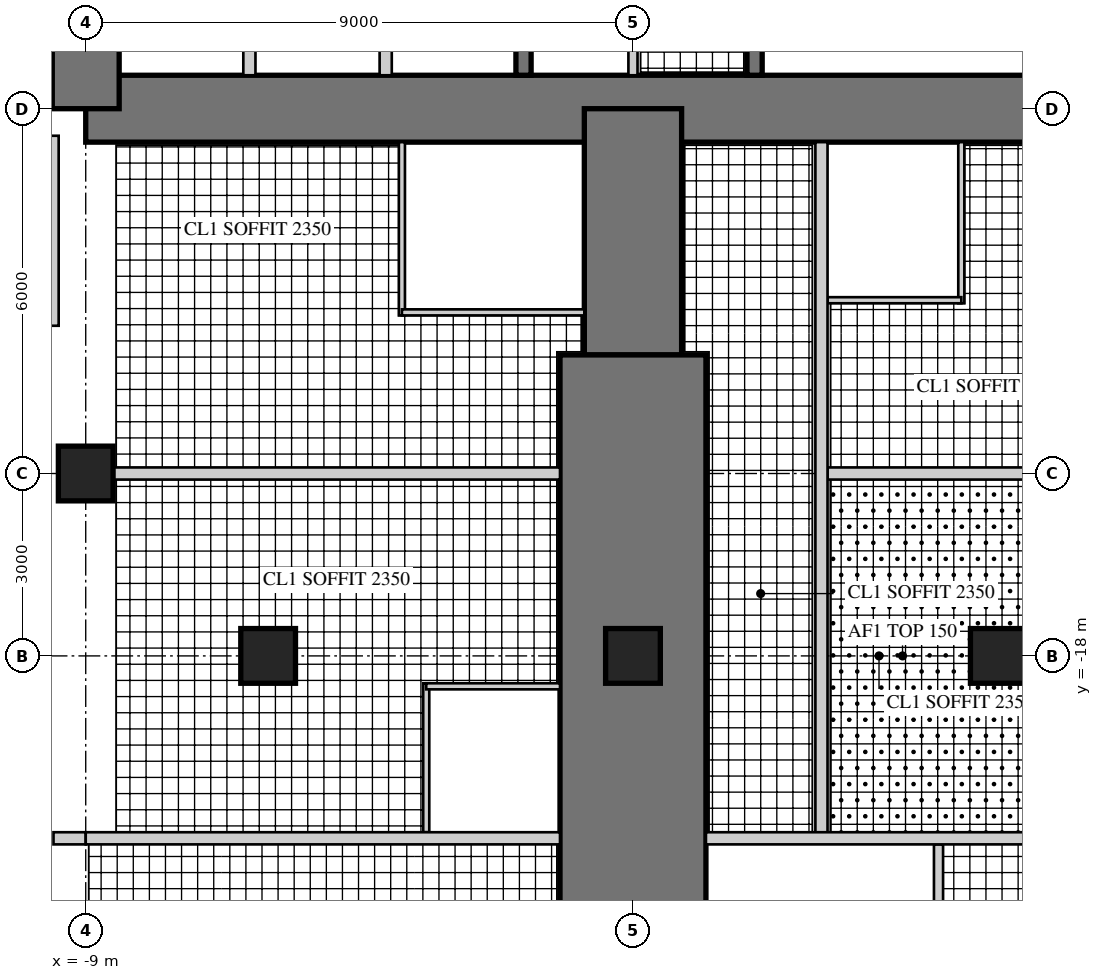
"""IFC4 building model, lengths in metres.
Left out: names, types, materials, properties, quantities, classifications, styles, units other than length and angle.
Written with IfcOpenShell. Run it as: python <this file> out.ifc"""

import sys

from ifc_helpers import new_model, si_unit, direction, frame, frame_2d, origin, origin_2d, place, context, subcontext, project, spatial, rectangle, hollow_rectangle, extrude, element, fill, save


model = new_model("IFC4")
c1 = context("Model", 3, precision=1e-05, world=origin(), true_north=direction((0.0, 1.0)))
c2 = subcontext(c1, "Body", "Model", "MODEL_VIEW")
j1 = project(units=[si_unit("LENGTHUNIT", "METRE"), si_unit("PLANEANGLEUNIT", "RADIAN")], contexts=[c1])
p1 = place(None, origin())
s1 = spatial("IfcSite", under=j1, at=p1, CompositionType="ELEMENT")
p2 = place(p1, origin())
s2 = spatial("IfcBuilding", under=s1, at=p2, CompositionType="ELEMENT")
p3 = place(p2, frame((0.0, 0.0, 206.9)))
s3 = spatial("IfcBuildingStorey", under=s2, at=p3, CompositionType="ELEMENT", Elevation=206.9)
p4 = place(p3, frame((-9.0, -9.0, 0.0), z_axis=(0.0, 0.0, 1.0), x_axis=(1.0, 0.0, 0.0)))
e1 = element("IfcWall", 1, at=p4, inside=s3, PredefinedType="SHEAR", context=c2, shape_type="SweptSolid", body=[
    extrude(rectangle(XDim=18.0, YDim=1.1, at=frame_2d((9.0, 0.0))), origin(), (0.0, 0.0, 1.0), 3.4),
])
p5 = place(p4, frame((9.8, 0.0, 0.0)))
e2 = element("IfcOpeningElement", 2, at=p5, cuts=e1, PredefinedType="OPENING", context=c2, shape_type="SweptSolid", body=[
    extrude(rectangle(XDim=1.0, YDim=2.4, at=frame_2d((0.5, 1.2))), frame((0.0, 0.56, 0.0), z_axis=(0.0, -1.0, 0.0), x_axis=(1.0, 0.0, 0.0)), (0.0, 0.0, 1.0), 1.12),
])
p6 = place(p3, frame((-9.0, 9.0, 0.0), z_axis=(0.0, 0.0, 1.0), x_axis=(0.0, -1.0, 0.0)))
e3 = element("IfcWall", 3, at=p6, inside=s3, PredefinedType="SHEAR", context=c2, shape_type="SweptSolid", body=[
    extrude(rectangle(XDim=18.0, YDim=1.1, at=frame_2d((9.0, 0.0))), origin(), (0.0, 0.0, 1.0), 3.4),
])
p7 = place(p6, frame((9.8, 0.0, 0.0)))
e4 = element("IfcOpeningElement", 4, at=p7, cuts=e3, PredefinedType="OPENING", context=c2, shape_type="SweptSolid", body=[
    extrude(rectangle(XDim=1.0, YDim=2.4, at=frame_2d((0.5, 1.2))), frame((0.0, 0.56, 0.0), z_axis=(0.0, -1.0, 0.0), x_axis=(1.0, 0.0, 0.0)), (0.0, 0.0, 1.0), 1.12),
])
p8 = place(p3, frame((-1.8, -1.875, 0.0), z_axis=(0.0, 0.0, 1.0), x_axis=(0.0, -1.0, 0.0)))
e5 = element("IfcWall", 5, at=p8, inside=s3, PredefinedType="SHEAR", context=c2, shape_type="SweptSolid", body=[
    extrude(rectangle(XDim=6.575, YDim=0.25, at=frame_2d((3.288, 0.0))), origin(), (0.0, 0.0, 1.0), 3.4),
])
p9 = place(p8, frame((1.875, 0.0, 0.0)))
e6 = element("IfcOpeningElement", 6, at=p9, cuts=e5, PredefinedType="OPENING", context=c2, shape_type="SweptSolid", body=[
    extrude(rectangle(XDim=1.6, YDim=2.4, at=frame_2d((0.8, 1.2))), frame((0.0, 0.135, 0.0), z_axis=(0.0, -1.0, 0.0), x_axis=(1.0, 0.0, 0.0)), (0.0, 0.0, 1.0), 0.27),
])
for number, where, z_axis, x_axis in (
    (7, (-4.067, -5.975, 0.0), (0.0, 0.0, 1.0), (0.0, -1.0, 0.0)),
    (8, (-6.308, -5.975, 0.0), (0.0, 0.0, 1.0), (0.0, -1.0, 0.0)),
):
    element("IfcWall", number, at=place(p3, frame(where, z_axis=z_axis, x_axis=x_axis)), inside=s3, PredefinedType="PARTITIONING", context=c2, shape_type="SweptSolid", body=[
        extrude(rectangle(XDim=2.475, YDim=0.2, at=frame_2d((1.237, 0.0))), origin(), (0.0, 0.0, 1.0), 3.4),
    ])
p10 = place(p3, frame((2.0, -1.675, 0.0), z_axis=(0.0, 0.0, 1.0), x_axis=(0.0, -1.0, 0.0)))
e9 = element("IfcWall", 9, at=p10, inside=s3, PredefinedType="SHEAR", context=c2, shape_type="SweptSolid", body=[
    extrude(rectangle(XDim=6.775, YDim=0.25, at=frame_2d((3.387, 0.0))), origin(), (0.0, 0.0, 1.0), 3.4),
])
p11 = place(p10, frame((0.725, 0.0, 0.0)))
e10 = element("IfcOpeningElement", 10, at=p11, cuts=e9, PredefinedType="OPENING", context=c2, shape_type="SweptSolid", body=[
    extrude(rectangle(XDim=1.0, YDim=2.1, at=frame_2d((0.5, 1.05))), frame((0.0, 0.135, 0.0), z_axis=(0.0, -1.0, 0.0), x_axis=(1.0, 0.0, 0.0)), (0.0, 0.0, 1.0), 0.27),
])
p12 = place(p3, frame((0.0, -9.0, 0.0), z_axis=(0.0, 0.0, 1.0), x_axis=(0.0, -1.0, 0.0)))
e11 = element("IfcWall", 11, at=p12, inside=s3, PredefinedType="SHEAR", context=c2, shape_type="SweptSolid", body=[
    extrude(rectangle(XDim=4.05, YDim=1.6, at=frame_2d((2.025, 0.0))), origin(), (0.0, 0.0, 1.0), 3.4),
])
p13 = place(p3, frame((0.0, -13.05, 0.0), z_axis=(0.0, 0.0, 1.0), x_axis=(0.0, -1.0, 0.0)))
e12 = element("IfcWall", 12, at=p13, inside=s3, PredefinedType="SHEAR", context=c2, shape_type="SweptSolid", body=[
    extrude(rectangle(XDim=13.95, YDim=2.4, at=frame_2d((6.975, 0.0))), origin(), (0.0, 0.0, 1.0), 3.4),
])
p14 = place(p13, frame((0.3, 0.0, 0.0)))
e13 = element("IfcOpeningElement", 13, at=p14, cuts=e12, PredefinedType="OPENING", context=c2, shape_type="SweptSolid", body=[
    extrude(rectangle(XDim=1.0, YDim=2.15, at=frame_2d((0.5, 1.075))), frame((0.0, 1.21, 0.0), z_axis=(0.0, -1.0, 0.0), x_axis=(1.0, 0.0, 0.0)), (0.0, 0.0, 1.0), 2.42),
])
p15 = place(p13, frame((2.55, 0.0, 0.0)))
e14 = element("IfcOpeningElement", 14, at=p15, cuts=e12, PredefinedType="OPENING", context=c2, shape_type="SweptSolid", body=[
    extrude(rectangle(XDim=1.0, YDim=2.15, at=frame_2d((0.5, 1.075))), frame((0.0, 1.21, 0.0), z_axis=(0.0, -1.0, 0.0), x_axis=(1.0, 0.0, 0.0)), (0.0, 0.0, 1.0), 2.42),
])
p16 = place(p13, frame((9.2, 0.0, 0.0)))
e15 = element("IfcOpeningElement", 15, at=p16, cuts=e12, PredefinedType="OPENING", context=c2, shape_type="SweptSolid", body=[
    extrude(rectangle(XDim=1.0, YDim=2.2, at=frame_2d((0.5, 1.1))), frame((0.0, 1.21, 0.0), z_axis=(0.0, -1.0, 0.0), x_axis=(1.0, 0.0, 0.0)), (0.0, 0.0, 1.0), 2.42),
])
for number, where, z_axis, x_axis in (
    (16, (-9.0, -15.0, 0.0), (0.0, 0.0, 1.0), (1.0, 0.0, 0.0)),
    (17, (-6.0, -18.0, 0.0), (0.0, 0.0, 1.0), (1.0, 0.0, 0.0)),
    (18, (0.0, -18.0, 0.0), (0.0, 0.0, 1.0), (1.0, 0.0, 0.0)),
    (19, (6.0, -18.0, 0.0), (0.0, 0.0, 1.0), (1.0, 0.0, 0.0)),
):
    element("IfcColumn", number, at=place(p3, frame(where, z_axis=z_axis, x_axis=x_axis)), inside=s3, PredefinedType="COLUMN", context=c2, shape_type="SweptSolid", body=[
        extrude(rectangle(XDim=0.9, YDim=0.9, at=origin_2d()), origin(), (0.0, 0.0, 1.0), 3.4),
    ])
p17 = place(p3, frame((-9.57, -9.445, 0.0), z_axis=(0.0, 0.0, 1.0), x_axis=(0.0, -1.0, 0.0)))
e20 = element("IfcWall", 20, at=p17, inside=s3, PredefinedType="SOLIDWALL", context=c2, shape_type="SweptSolid", body=[
    extrude(rectangle(XDim=3.125, YDim=0.25, at=frame_2d((1.562, 0.0))), origin(), (0.0, 0.0, 1.0), 3.22),
])
p18 = place(p17, frame((0.6, 0.0, 0.0)))
e21 = element("IfcOpeningElement", 21, at=p18, cuts=e20, PredefinedType="OPENING", context=c2, shape_type="SweptSolid", body=[
    extrude(rectangle(XDim=1.0, YDim=2.2, at=frame_2d((0.5, 1.1))), frame((0.0, 0.135, 0.0), z_axis=(0.0, -1.0, 0.0), x_axis=(1.0, 0.0, 0.0)), (0.0, 0.0, 1.0), 0.27),
])
p19 = place(p3, frame((0.0, -5.675, 0.0), z_axis=(0.0, 0.0, 1.0), x_axis=(0.0, -1.0, 0.0)))
e22 = element("IfcWall", 22, at=p19, inside=s3, PredefinedType="PARTITIONING", context=c2, shape_type="SweptSolid", body=[
    extrude(rectangle(XDim=2.775, YDim=0.15, at=frame_2d((1.387, 0.0))), origin(), (0.0, 0.0, 1.0), 3.22),
])
p20 = place(p19, frame((0.4, 0.0, 0.0)))
e23 = element("IfcOpeningElement", 23, at=p20, cuts=e22, PredefinedType="OPENING", context=c2, shape_type="SweptSolid", body=[
    extrude(rectangle(XDim=1.0, YDim=2.1, at=frame_2d((0.5, 1.05))), frame((0.0, 0.085, 0.0), z_axis=(0.0, -1.0, 0.0), x_axis=(1.0, 0.0, 0.0)), (0.0, 0.0, 1.0), 0.17),
])
p21 = place(p3, frame((5.4, -9.55, 0.0), z_axis=(0.0, 0.0, 1.0), x_axis=(0.0, -1.0, 0.0)))
e24 = element("IfcWall", 24, at=p21, inside=s3, PredefinedType="PARTITIONING", context=c2, shape_type="SweptSolid", body=[
    extrude(rectangle(XDim=2.65, YDim=0.1, at=frame_2d((1.325, 0.0))), origin(), (0.0, 0.0, 1.0), 3.22),
])
p22 = place(p3, frame((3.2, -12.15, 0.0), z_axis=(0.0, 0.0, 1.0), x_axis=(1.0, 0.0, 0.0)))
e25 = element("IfcWall", 25, at=p22, inside=s3, PredefinedType="PARTITIONING", context=c2, shape_type="SweptSolid", body=[
    extrude(rectangle(XDim=2.2, YDim=0.1, at=frame_2d((1.1, 0.0))), origin(), (0.0, 0.0, 1.0), 3.22),
])
p23 = place(p22, frame((0.55, 0.0, 0.0)))
e26 = element("IfcOpeningElement", 26, at=p23, cuts=e25, PredefinedType="OPENING", context=c2, shape_type="SweptSolid", body=[
    extrude(rectangle(XDim=0.9, YDim=2.1, at=frame_2d((0.45, 1.05))), frame((0.0, 0.06, 0.0), z_axis=(0.0, -1.0, 0.0), x_axis=(1.0, 0.0, 0.0)), (0.0, 0.0, 1.0), 0.12),
])
p24 = place(p3, frame((-3.8, -9.55, 0.0), z_axis=(0.0, 0.0, 1.0), x_axis=(0.0, -1.0, 0.0)))
e27 = element("IfcWall", 27, at=p24, inside=s3, PredefinedType="PARTITIONING", context=c2, shape_type="SweptSolid", body=[
    extrude(rectangle(XDim=2.85, YDim=0.1, at=frame_2d((1.425, 0.0))), origin(), (0.0, 0.0, 1.0), 3.22),
])
p25 = place(p3, frame((-3.8, -12.35, 0.0), z_axis=(0.0, 0.0, 1.0), x_axis=(1.0, 0.0, 0.0)))
e28 = element("IfcWall", 28, at=p25, inside=s3, PredefinedType="PARTITIONING", context=c2, shape_type="SweptSolid", body=[
    extrude(rectangle(XDim=3.0, YDim=0.1, at=frame_2d((1.5, 0.0))), origin(), (0.0, 0.0, 1.0), 3.22),
])
p26 = place(p25, frame((0.55, 0.0, 0.0)))
e29 = element("IfcOpeningElement", 29, at=p26, cuts=e28, PredefinedType="OPENING", context=c2, shape_type="SweptSolid", body=[
    extrude(rectangle(XDim=0.9, YDim=2.1, at=frame_2d((0.45, 1.05))), frame((0.0, 0.06, 0.0), z_axis=(0.0, -1.0, 0.0), x_axis=(1.0, 0.0, 0.0)), (0.0, 0.0, 1.0), 0.12),
])
p27 = place(p3, frame((3.2, -15.0, 0.0), z_axis=(0.0, 0.0, 1.0), x_axis=(1.0, 0.0, 0.0)))
e30 = element("IfcWall", 30, at=p27, inside=s3, PredefinedType="SOLIDWALL", context=c2, shape_type="SweptSolid", body=[
    extrude(rectangle(XDim=5.35, YDim=0.2, at=frame_2d((2.675, 0.0))), origin(), (0.0, 0.0, 1.0), 2.47),
])
p28 = place(p3, frame((-8.55, -15.0, 0.0), z_axis=(0.0, 0.0, 1.0), x_axis=(1.0, 0.0, 0.0)))
e31 = element("IfcWall", 31, at=p28, inside=s3, PredefinedType="SOLIDWALL", context=c2, shape_type="SweptSolid", body=[
    extrude(rectangle(XDim=7.35, YDim=0.2, at=frame_2d((3.675, 0.0))), origin(), (0.0, 0.0, 1.0), 2.47),
])
p29 = place(p3, frame((-3.4, -18.45, 0.0), z_axis=(0.0, 0.0, 1.0), x_axis=(0.0, -1.0, 0.0)))
e32 = element("IfcWall", 32, at=p29, inside=s3, PredefinedType="PARTITIONING", context=c2, shape_type="SweptSolid", body=[
    extrude(rectangle(XDim=2.45, YDim=0.1, at=frame_2d((1.225, 0.0))), origin(), (0.0, 0.0, 1.0), 3.22),
])
p30 = place(p3, frame((-3.4, -18.5, 0.0), z_axis=(0.0, 0.0, 1.0), x_axis=(1.0, 0.0, 0.0)))
e33 = element("IfcWall", 33, at=p30, inside=s3, PredefinedType="PARTITIONING", context=c2, shape_type="SweptSolid", body=[
    extrude(rectangle(XDim=2.2, YDim=0.1, at=frame_2d((1.1, 0.0))), origin(), (0.0, 0.0, 1.0), 3.22),
])
p31 = place(p30, frame((0.55, 0.0, 0.0)))
e34 = element("IfcOpeningElement", 34, at=p31, cuts=e33, PredefinedType="OPENING", context=c2, shape_type="SweptSolid", body=[
    extrude(rectangle(XDim=0.9, YDim=2.1, at=frame_2d((0.45, 1.05))), frame((0.0, 0.06, 0.0), z_axis=(0.0, -1.0, 0.0), x_axis=(1.0, 0.0, 0.0)), (0.0, 0.0, 1.0), 0.12),
])
p32 = place(p3, frame((3.1, -9.55, 0.0), z_axis=(0.0, 0.0, 1.0), x_axis=(0.0, -1.0, 0.0)))
e35 = element("IfcWall", 35, at=p32, inside=s3, PredefinedType="SOLIDWALL", context=c2, shape_type="SweptSolid", body=[
    extrude(rectangle(XDim=11.45, YDim=0.2, at=frame_2d((5.725, 0.0))), origin(), (0.0, 0.0, 1.0), 3.22),
])
p33 = place(p32, frame((3.4, 0.0, 0.0)))
e36 = element("IfcOpeningElement", 36, at=p33, cuts=e35, PredefinedType="OPENING", context=c2, shape_type="SweptSolid", body=[
    extrude(rectangle(XDim=1.0, YDim=2.15, at=frame_2d((0.5, 1.075))), frame((0.0, 0.11, 0.0), z_axis=(0.0, -1.0, 0.0), x_axis=(1.0, 0.0, 0.0)), (0.0, 0.0, 1.0), 0.22),
])
p34 = place(p32, frame((6.65, 0.0, 0.0)))
e37 = element("IfcOpeningElement", 37, at=p34, cuts=e35, PredefinedType="OPENING", context=c2, shape_type="SweptSolid", body=[
    extrude(rectangle(XDim=1.0, YDim=2.2, at=frame_2d((0.5, 1.1))), frame((0.0, 0.11, 0.0), z_axis=(0.0, -1.0, 0.0), x_axis=(1.0, 0.0, 0.0)), (0.0, 0.0, 1.0), 0.22),
])
p35 = place(p3, frame((5.025, -21.1, 0.0), z_axis=(0.0, 0.0, 1.0), x_axis=(0.0, -1.0, 0.0)))
e38 = element("IfcWall", 38, at=p35, inside=s3, PredefinedType="PARTITIONING", context=c2, shape_type="SweptSolid", body=[
    extrude(rectangle(XDim=5.45, YDim=0.15, at=frame_2d((2.725, 0.0))), origin(), (0.0, 0.0, 1.0), 3.22),
])
p36 = place(p35, frame((0.6, 0.0, 0.0)))
e39 = element("IfcOpeningElement", 39, at=p36, cuts=e38, PredefinedType="OPENING", context=c2, shape_type="SweptSolid", body=[
    extrude(rectangle(XDim=1.0, YDim=2.1, at=frame_2d((0.5, 1.05))), frame((0.0, 0.085, 0.0), z_axis=(0.0, -1.0, 0.0), x_axis=(1.0, 0.0, 0.0)), (0.0, 0.0, 1.0), 0.17),
])
p37 = place(p3, frame((-9.53, -21.0, 0.0), z_axis=(0.0, 0.0, 1.0), x_axis=(1.0, 0.0, 0.0)))
e40 = element("IfcWall", 40, at=p37, inside=s3, PredefinedType="SOLIDWALL", context=c2, shape_type="SweptSolid", body=[
    extrude(rectangle(XDim=0.53, YDim=0.2, at=frame_2d((0.265, 0.0))), origin(), (0.0, 0.0, 1.0), 3.22),
])
p38 = place(p3, frame((-9.0, -21.0, 0.0), z_axis=(0.0, 0.0, 1.0), x_axis=(1.0, 0.0, 0.0)))
e41 = element("IfcWall", 41, at=p38, inside=s3, PredefinedType="SOLIDWALL", context=c2, shape_type="SweptSolid", body=[
    extrude(rectangle(XDim=7.8, YDim=0.2, at=frame_2d((3.9, 0.0))), origin(), (0.0, 0.0, 1.0), 2.62),
])
p39 = place(p3, frame((1.2, -21.0, 0.0), z_axis=(0.0, 0.0, 1.0), x_axis=(1.0, 0.0, 0.0)))
e42 = element("IfcWall", 42, at=p39, inside=s3, PredefinedType="SOLIDWALL", context=c2, shape_type="SweptSolid", body=[
    extrude(rectangle(XDim=7.8, YDim=0.2, at=frame_2d((3.9, 0.0))), origin(), (0.0, 0.0, 1.0), 2.62),
])
p40 = place(p39, frame((0.35, 0.0, 0.0)))
e43 = element("IfcOpeningElement", 43, at=p40, cuts=e42, PredefinedType="OPENING", context=c2, shape_type="SweptSolid", body=[
    extrude(rectangle(XDim=1.0, YDim=2.2, at=frame_2d((0.5, 1.1))), frame((0.0, 0.11, 0.0), z_axis=(0.0, -1.0, 0.0), x_axis=(1.0, 0.0, 0.0)), (0.0, 0.0, 1.0), 0.22),
])
p41 = place(p18, origin())
e44 = element("IfcDoor", 44, at=p41, inside=s3, OperationType="SINGLE_SWING_LEFT", PredefinedType="DOOR", context=c2, shape_type="SweptSolid", body=[
    extrude(hollow_rectangle(XDim=1.0, YDim=2.2, WallThickness=0.06, at=frame_2d((0.5, 1.1))), frame((0.0, 0.025, 0.0), z_axis=(0.0, -1.0, 0.0), x_axis=(1.0, 0.0, 0.0)), (0.0, 0.0, 1.0), 0.05),
    extrude(rectangle(XDim=0.879, YDim=2.079, at=frame_2d((0.5, 1.1))), frame((0.0, 0.025, 0.0), z_axis=(0.0, -1.0, 0.0), x_axis=(1.0, 0.0, 0.0)), (0.0, 0.0, 1.0), 0.05),
])
fill(e21, e44)
p42 = place(p23, origin())
e45 = element("IfcDoor", 45, at=p42, inside=s3, OperationType="SINGLE_SWING_LEFT", PredefinedType="DOOR", context=c2, shape_type="SweptSolid", body=[
    extrude(rectangle(XDim=0.9, YDim=2.1, at=frame_2d((0.45, 1.05))), frame((0.0, 0.025, 0.0), z_axis=(0.0, -1.0, 0.0), x_axis=(1.0, 0.0, 0.0)), (0.0, 0.0, 1.0), 0.05),
])
fill(e26, e45)
p43 = place(p26, origin())
e46 = element("IfcDoor", 46, at=p43, inside=s3, OperationType="SINGLE_SWING_LEFT", PredefinedType="DOOR", context=c2, shape_type="SweptSolid", body=[
    extrude(rectangle(XDim=0.9, YDim=2.1, at=frame_2d((0.45, 1.05))), frame((0.0, 0.025, 0.0), z_axis=(0.0, -1.0, 0.0), x_axis=(1.0, 0.0, 0.0)), (0.0, 0.0, 1.0), 0.05),
])
fill(e29, e46)
p44 = place(p31, frame((0.9, 0.0, 0.0), z_axis=(0.0, 0.0, 1.0), x_axis=(-1.0, 0.0, 0.0)))
e47 = element("IfcDoor", 47, at=p44, inside=s3, OperationType="SINGLE_SWING_RIGHT", PredefinedType="DOOR", context=c2, shape_type="SweptSolid", body=[
    extrude(rectangle(XDim=0.9, YDim=2.1, at=frame_2d((0.45, 1.05))), frame((0.0, 0.025, 0.0), z_axis=(0.0, -1.0, 0.0), x_axis=(1.0, 0.0, 0.0)), (0.0, 0.0, 1.0), 0.05),
])
fill(e34, e47)
p45 = place(p33, origin())
e48 = element("IfcDoor", 48, at=p45, inside=s3, OperationType="SINGLE_SWING_LEFT", PredefinedType="DOOR", context=c2, shape_type="SweptSolid", body=[
    extrude(rectangle(XDim=1.0, YDim=2.15, at=frame_2d((0.5, 1.075))), frame((0.0, 0.025, 0.0), z_axis=(0.0, -1.0, 0.0), x_axis=(1.0, 0.0, 0.0)), (0.0, 0.0, 1.0), 0.05),
])
fill(e36, e48)
p46 = place(p34, origin())
e49 = element("IfcDoor", 49, at=p46, inside=s3, OperationType="SINGLE_SWING_LEFT", PredefinedType="DOOR", context=c2, shape_type="SweptSolid", body=[
    extrude(rectangle(XDim=1.0, YDim=2.2, at=frame_2d((0.5, 1.1))), frame((0.0, 0.025, 0.0), z_axis=(0.0, -1.0, 0.0), x_axis=(1.0, 0.0, 0.0)), (0.0, 0.0, 1.0), 0.05),
])
fill(e37, e49)
p47 = place(p36, origin())
e50 = element("IfcDoor", 50, at=p47, inside=s3, OperationType="SINGLE_SWING_LEFT", PredefinedType="DOOR", context=c2, shape_type="SweptSolid", body=[
    extrude(rectangle(XDim=1.0, YDim=2.1, at=frame_2d((0.5, 1.05))), frame((0.0, 0.025, 0.0), z_axis=(0.0, -1.0, 0.0), x_axis=(1.0, 0.0, 0.0)), (0.0, 0.0, 1.0), 0.05),
])
fill(e39, e50)
p48 = place(p40, frame((1.0, 0.0, 0.0), z_axis=(0.0, 0.0, 1.0), x_axis=(-1.0, 0.0, 0.0)))
e51 = element("IfcDoor", 51, at=p48, inside=s3, OperationType="SINGLE_SWING_RIGHT", PredefinedType="DOOR", context=c2, shape_type="SweptSolid", body=[
    extrude(rectangle(XDim=1.0, YDim=2.2, at=frame_2d((0.5, 1.1))), frame((0.0, 0.025, 0.0), z_axis=(0.0, -1.0, 0.0), x_axis=(1.0, 0.0, 0.0)), (0.0, 0.0, 1.0), 0.05),
])
fill(e43, e51)
p49 = place(p14, frame((1.0, 0.0, 0.0), z_axis=(0.0, 0.0, 1.0), x_axis=(-1.0, 0.0, 0.0)))
e52 = element("IfcDoor", 52, at=p49, inside=s3, OperationType="SINGLE_SWING_LEFT", PredefinedType="DOOR", context=c2, shape_type="SweptSolid", body=[
    extrude(rectangle(XDim=1.0, YDim=2.15, at=frame_2d((0.5, 1.075))), frame((0.0, 0.025, 0.0), z_axis=(0.0, -1.0, 0.0), x_axis=(1.0, 0.0, 0.0)), (0.0, 0.0, 1.0), 0.05),
])
fill(e13, e52)
p50 = place(p15, frame((1.0, 0.0, 0.0), z_axis=(0.0, 0.0, 1.0), x_axis=(-1.0, 0.0, 0.0)))
e53 = element("IfcDoor", 53, at=p50, inside=s3, OperationType="SINGLE_SWING_RIGHT", PredefinedType="DOOR", context=c2, shape_type="SweptSolid", body=[
    extrude(rectangle(XDim=1.0, YDim=2.15, at=frame_2d((0.5, 1.075))), frame((0.0, 0.025, 0.0), z_axis=(0.0, -1.0, 0.0), x_axis=(1.0, 0.0, 0.0)), (0.0, 0.0, 1.0), 0.05),
])
fill(e14, e53)
p51 = place(p5, origin())
e54 = element("IfcDoor", 54, at=p51, inside=s3, OperationType="SINGLE_SWING_RIGHT", PredefinedType="DOOR", context=c2, shape_type="SweptSolid", body=[
    extrude(rectangle(XDim=1.0, YDim=2.4, at=frame_2d((0.5, 1.2))), frame((0.0, 0.055, 0.0), z_axis=(0.0, -1.0, 0.0), x_axis=(1.0, 0.0, 0.0)), (0.0, 0.0, 1.0), 0.05),
])
fill(e2, e54)
save(model, sys.argv[1])
